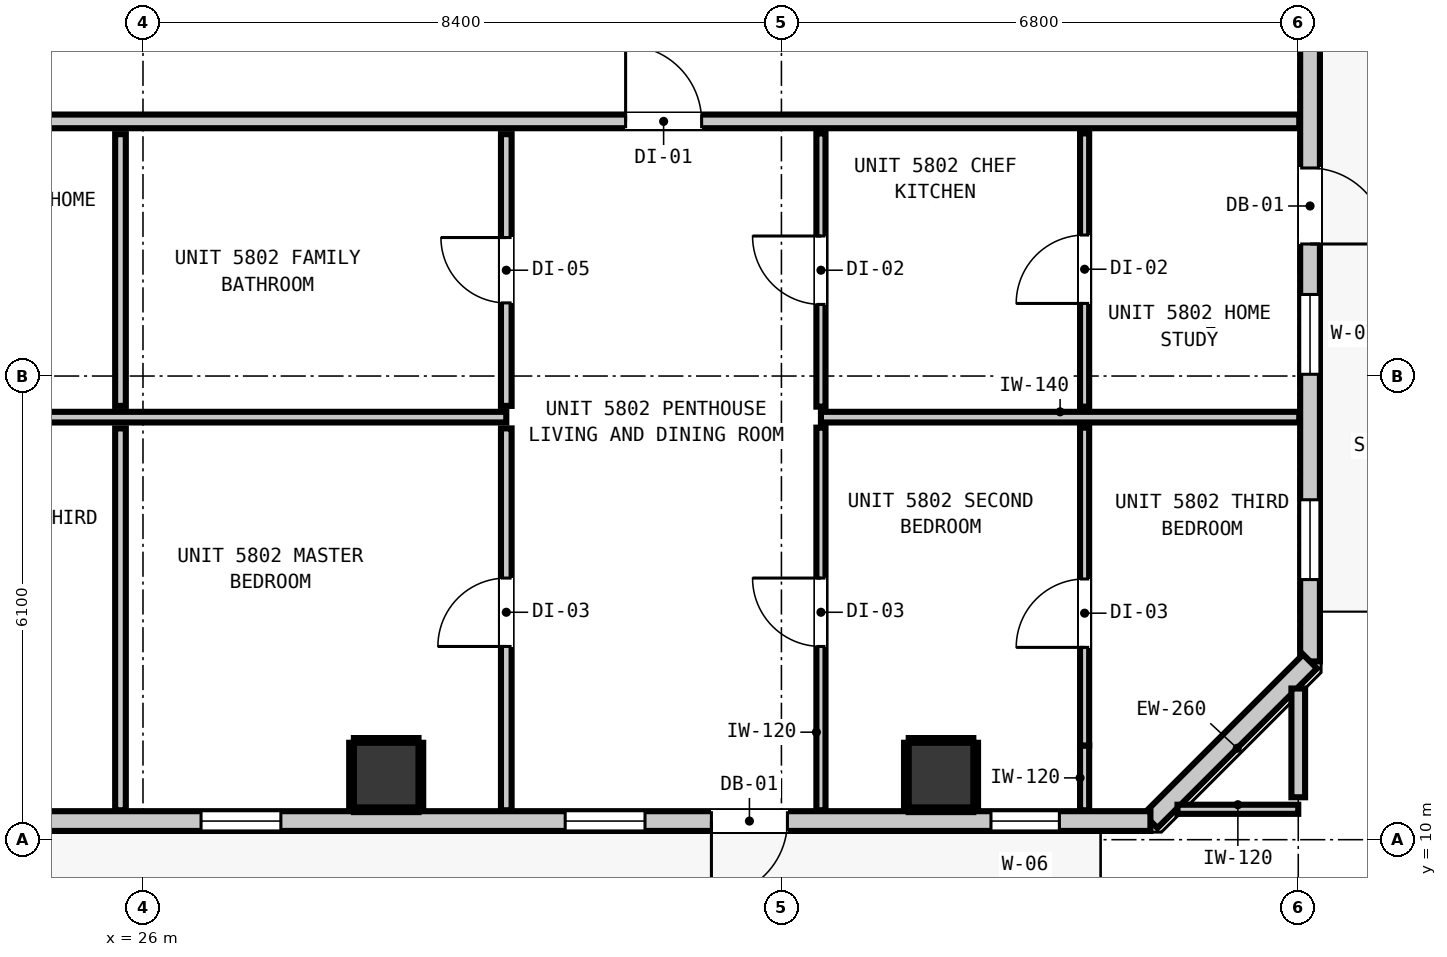
"""IFC4 building model, lengths in metres.
Left out: names, types, materials, properties, quantities, classifications, styles, units other than length and angle.
Written with IfcOpenShell. Run it as: python <this file> out.ifc"""

import sys

from ifc_helpers import new_model, si_unit, direction, frame, frame_2d, origin, origin_2d, place, context, subcontext, project, spatial, rectangle, extrude, element, fill, save


model = new_model("IFC4")
c1 = context("Model", 3, precision=1e-05, world=origin(), true_north=direction((0.0, 1.0)))
c2 = subcontext(c1, "Body", "Model", "MODEL_VIEW")
j1 = project(units=[si_unit("LENGTHUNIT", "METRE"), si_unit("PLANEANGLEUNIT", "RADIAN")], contexts=[c1])
p1 = place(None, origin())
s1 = spatial("IfcSite", under=j1, at=p1, CompositionType="ELEMENT")
p2 = place(p1, origin())
s2 = spatial("IfcBuilding", under=s1, at=p2, CompositionType="ELEMENT")
p3 = place(p2, frame((0.0, 0.0, 200.12)))
s3 = spatial("IfcBuildingStorey", under=s2, at=p3, CompositionType="ELEMENT", Elevation=200.12)
for number, where, z_axis, x_axis in (
    (1, (29.2, 10.85, 0.0), (0.0, 0.0, 1.0), (1.0, 0.0, 0.0)),
    (2, (36.5, 10.85, 0.0), (0.0, 0.0, 1.0), (1.0, 0.0, 0.0)),
):
    element("IfcColumn", number, at=place(p3, frame(where, z_axis=z_axis, x_axis=x_axis)), inside=s3, PredefinedType="COLUMN", context=c2, shape_type="SweptSolid", body=[
        extrude(rectangle(XDim=0.85, YDim=0.85, at=origin_2d()), origin(), (0.0, 0.0, 1.0), 3.32),
    ])
p4 = place(p3, frame((41.355, 42.655, 0.0), z_axis=(0.0, 0.0, 1.0), x_axis=(0.0, -1.0, 0.0)))
e3 = element("IfcWall", 3, at=p4, inside=s3, PredefinedType="STANDARD", context=c2, shape_type="SweptSolid", body=[
    extrude(rectangle(XDim=30.31, YDim=0.26, at=frame_2d((15.155, 0.0))), origin(), (0.0, 0.0, 1.0), 3.1),
])
p5 = place(p4, frame((23.818, 0.0, 0.0)))
e4 = element("IfcOpeningElement", 4, at=p5, cuts=e3, PredefinedType="OPENING", context=c2, shape_type="SweptSolid", body=[
    extrude(rectangle(XDim=1.0, YDim=2.15, at=frame_2d((0.5, 1.075))), frame((0.0, 0.14, 0.0), z_axis=(0.0, -1.0, 0.0), x_axis=(1.0, 0.0, 0.0)), (0.0, 0.0, 1.0), 0.28),
])
p6 = place(p4, frame((25.482, 0.0, 0.85)))
e5 = element("IfcOpeningElement", 5, at=p6, cuts=e3, PredefinedType="OPENING", context=c2, shape_type="SweptSolid", body=[
    extrude(rectangle(XDim=1.05, YDim=1.65, at=frame_2d((0.525, 0.825))), frame((0.0, 0.14, 0.0), z_axis=(0.0, -1.0, 0.0), x_axis=(1.0, 0.0, 0.0)), (0.0, 0.0, 1.0), 0.28),
])
p7 = place(p4, frame((28.183, 0.0, 0.85)))
e6 = element("IfcOpeningElement", 6, at=p7, cuts=e3, PredefinedType="OPENING", context=c2, shape_type="SweptSolid", body=[
    extrude(rectangle(XDim=1.05, YDim=1.65, at=frame_2d((0.525, 0.825))), frame((0.0, 0.14, 0.0), z_axis=(0.0, -1.0, 0.0), x_axis=(1.0, 0.0, 0.0)), (0.0, 0.0, 1.0), 0.28),
])
p8 = place(p3, frame((41.355, 12.345, 0.0), z_axis=(0.0, 0.0, 1.0), x_axis=(-0.707147883682, -0.707065676302, 0.0)))
e7 = element("IfcWall", 7, at=p8, inside=s3, PredefinedType="STANDARD", context=c2, shape_type="SweptSolid", body=[
    extrude(rectangle(XDim=2.97, YDim=0.26, at=frame_2d((1.485, 0.0))), origin(), (0.0, 0.0, 1.0), 3.1),
])
p9 = place(p3, frame((39.255, 10.245, 0.0), z_axis=(0.0, 0.0, 1.0), x_axis=(-1.0, 0.0, 0.0)))
e8 = element("IfcWall", 8, at=p9, inside=s3, PredefinedType="STANDARD", context=c2, shape_type="SweptSolid", body=[
    extrude(rectangle(XDim=32.71, YDim=0.26, at=frame_2d((16.355, 0.0))), origin(), (0.0, 0.0, 1.0), 3.1),
])
p10 = place(p9, frame((4.776, 0.0, 0.0)))
e9 = element("IfcOpeningElement", 9, at=p10, cuts=e8, PredefinedType="OPENING", context=c2, shape_type="SweptSolid", body=[
    extrude(rectangle(XDim=1.0, YDim=2.15, at=frame_2d((0.5, 1.075))), frame((0.0, 0.14, 0.0), z_axis=(0.0, -1.0, 0.0), x_axis=(1.0, 0.0, 0.0)), (0.0, 0.0, 1.0), 0.28),
])
p11 = place(p9, frame((26.49, 0.0, 0.85)))
e10 = element("IfcOpeningElement", 10, at=p11, cuts=e8, PredefinedType="OPENING", context=c2, shape_type="SweptSolid", body=[
    extrude(rectangle(XDim=3.0, YDim=2.1, at=frame_2d((1.5, 1.05))), frame((0.0, 0.14, 0.0), z_axis=(0.0, -1.0, 0.0), x_axis=(1.0, 0.0, 0.0)), (0.0, 0.0, 1.0), 0.28),
])
p12 = place(p9, frame((30.736, 0.0, 0.85)))
e11 = element("IfcOpeningElement", 11, at=p12, cuts=e8, PredefinedType="OPENING", context=c2, shape_type="SweptSolid", body=[
    extrude(rectangle(XDim=1.05, YDim=1.65, at=frame_2d((0.525, 0.825))), frame((0.0, 0.14, 0.0), z_axis=(0.0, -1.0, 0.0), x_axis=(1.0, 0.0, 0.0)), (0.0, 0.0, 1.0), 0.28),
])
p13 = place(p9, frame((19.625, 0.0, 0.85)))
e12 = element("IfcOpeningElement", 12, at=p13, cuts=e8, PredefinedType="OPENING", context=c2, shape_type="SweptSolid", body=[
    extrude(rectangle(XDim=3.0, YDim=2.1, at=frame_2d((1.5, 1.05))), frame((0.0, 0.14, 0.0), z_axis=(0.0, -1.0, 0.0), x_axis=(1.0, 0.0, 0.0)), (0.0, 0.0, 1.0), 0.28),
])
p14 = place(p9, frame((14.688, 0.0, 0.85)))
e13 = element("IfcOpeningElement", 13, at=p14, cuts=e8, PredefinedType="OPENING", context=c2, shape_type="SweptSolid", body=[
    extrude(rectangle(XDim=1.05, YDim=1.65, at=frame_2d((0.525, 0.825))), frame((0.0, 0.14, 0.0), z_axis=(0.0, -1.0, 0.0), x_axis=(1.0, 0.0, 0.0)), (0.0, 0.0, 1.0), 0.28),
])
p15 = place(p9, frame((6.65, 0.0, 0.85)))
e14 = element("IfcOpeningElement", 14, at=p15, cuts=e8, PredefinedType="OPENING", context=c2, shape_type="SweptSolid", body=[
    extrude(rectangle(XDim=1.05, YDim=1.65, at=frame_2d((0.525, 0.825))), frame((0.0, 0.14, 0.0), z_axis=(0.0, -1.0, 0.0), x_axis=(1.0, 0.0, 0.0)), (0.0, 0.0, 1.0), 0.28),
])
p16 = place(p9, frame((11.441, 0.0, 0.85)))
e15 = element("IfcOpeningElement", 15, at=p16, cuts=e8, PredefinedType="OPENING", context=c2, shape_type="SweptSolid", body=[
    extrude(rectangle(XDim=1.05, YDim=1.65, at=frame_2d((0.525, 0.825))), frame((0.0, 0.14, 0.0), z_axis=(0.0, -1.0, 0.0), x_axis=(1.0, 0.0, 0.0)), (0.0, 0.0, 1.0), 0.28),
])
p17 = place(p9, frame((1.198, 0.0, 0.85)))
e16 = element("IfcOpeningElement", 16, at=p17, cuts=e8, PredefinedType="OPENING", context=c2, shape_type="SweptSolid", body=[
    extrude(rectangle(XDim=0.9, YDim=1.5, at=frame_2d((0.45, 0.75))), frame((0.0, 0.14, 0.0), z_axis=(0.0, -1.0, 0.0), x_axis=(1.0, 0.0, 0.0)), (0.0, 0.0, 1.0), 0.28),
])
p18 = place(p3, frame((4.587, 19.45, 0.0), z_axis=(0.0, 0.0, 1.0), x_axis=(1.0, 0.0, 0.0)))
e17 = element("IfcWall", 17, at=p18, inside=s3, PredefinedType="PARTITIONING", context=c2, shape_type="SweptSolid", body=[
    extrude(rectangle(XDim=36.626, YDim=0.18, at=frame_2d((18.313, 0.0))), origin(), (0.0, 0.0, 1.0), 3.1),
])
p19 = place(p18, frame((7.533, 0.0, 0.0)))
e18 = element("IfcOpeningElement", 18, at=p19, cuts=e17, PredefinedType="OPENING", context=c2, shape_type="SweptSolid", body=[
    extrude(rectangle(XDim=1.0, YDim=2.15, at=frame_2d((0.5, 1.075))), frame((0.0, 0.1, 0.0), z_axis=(0.0, -1.0, 0.0), x_axis=(1.0, 0.0, 0.0)), (0.0, 0.0, 1.0), 0.2),
])
p20 = place(p18, frame((27.763, 0.0, 0.0)))
e19 = element("IfcOpeningElement", 19, at=p20, cuts=e17, PredefinedType="OPENING", context=c2, shape_type="SweptSolid", body=[
    extrude(rectangle(XDim=1.0, YDim=2.15, at=frame_2d((0.5, 1.075))), frame((0.0, 0.1, 0.0), z_axis=(0.0, -1.0, 0.0), x_axis=(1.0, 0.0, 0.0)), (0.0, 0.0, 1.0), 0.2),
])
p21 = place(p3, frame((15.785, 15.559, 0.0), z_axis=(0.0, 0.0, 1.0), x_axis=(1.0, 0.0, 0.0)))
e20 = element("IfcWall", 20, at=p21, inside=s3, PredefinedType="PARTITIONING", context=c2, shape_type="SweptSolid", body=[
    extrude(rectangle(XDim=14.995, YDim=0.14, at=frame_2d((7.498, 0.0))), origin(), (0.0, 0.0, 1.0), 3.1),
])
p22 = place(p3, frame((34.92, 15.559, 0.0), z_axis=(0.0, 0.0, 1.0), x_axis=(1.0, 0.0, 0.0)))
e21 = element("IfcWall", 21, at=p22, inside=s3, PredefinedType="PARTITIONING", context=c2, shape_type="SweptSolid", body=[
    extrude(rectangle(XDim=6.293, YDim=0.14, at=frame_2d((3.146, 0.0))), origin(), (0.0, 0.0, 1.0), 3.1),
])
p23 = place(p3, frame((39.611, 10.4, 0.0), z_axis=(0.0, 0.0, 1.0), x_axis=(1.0, 0.0, 0.0)))
e22 = element("IfcWall", 22, at=p23, inside=s3, PredefinedType="PARTITIONING", context=c2, shape_type="SweptSolid", body=[
    extrude(rectangle(XDim=1.589, YDim=0.12, at=frame_2d((0.794, 0.0))), origin(), (0.0, 0.0, 1.0), 3.1),
])
p24 = place(p3, frame((41.2, 10.558, 0.0), z_axis=(0.0, 0.0, 1.0), x_axis=(0.0, 1.0, 0.0)))
e23 = element("IfcWall", 23, at=p24, inside=s3, PredefinedType="PARTITIONING", context=c2, shape_type="SweptSolid", body=[
    extrude(rectangle(XDim=1.431, YDim=0.18, at=frame_2d((0.715, 0.0))), origin(), (0.0, 0.0, 1.0), 3.1),
])
p25 = place(p3, frame((25.704, 10.387, 0.0), z_axis=(0.0, 0.0, 1.0), x_axis=(0.0, 1.0, 0.0)))
e24 = element("IfcWall", 24, at=p25, inside=s3, PredefinedType="PARTITIONING", context=c2, shape_type="SweptSolid", body=[
    extrude(rectangle(XDim=5.024, YDim=0.14, at=frame_2d((2.512, 0.0))), origin(), (0.0, 0.0, 1.0), 3.1),
])
p26 = place(p3, frame((25.704, 15.707, 0.0), z_axis=(0.0, 0.0, 1.0), x_axis=(0.0, 1.0, 0.0)))
e25 = element("IfcWall", 25, at=p26, inside=s3, PredefinedType="PARTITIONING", context=c2, shape_type="SweptSolid", body=[
    extrude(rectangle(XDim=3.575, YDim=0.14, at=frame_2d((1.788, 0.0))), origin(), (0.0, 0.0, 1.0), 3.1),
])
p27 = place(p3, frame((30.78, 10.387, 0.0), z_axis=(0.0, 0.0, 1.0), x_axis=(0.0, 1.0, 0.0)))
e26 = element("IfcWall", 26, at=p27, inside=s3, PredefinedType="PARTITIONING", context=c2, shape_type="SweptSolid", body=[
    extrude(rectangle(XDim=5.024, YDim=0.14, at=frame_2d((2.512, 0.0))), origin(), (0.0, 0.0, 1.0), 3.1),
])
p28 = place(p27, frame((2.155, 0.0, 0.0)))
e27 = element("IfcOpeningElement", 27, at=p28, cuts=e26, PredefinedType="OPENING", context=c2, shape_type="SweptSolid", body=[
    extrude(rectangle(XDim=0.9, YDim=2.1, at=frame_2d((0.45, 1.05))), frame((0.0, 0.08, 0.0), z_axis=(0.0, -1.0, 0.0), x_axis=(1.0, 0.0, 0.0)), (0.0, 0.0, 1.0), 0.16),
])
p29 = place(p3, frame((30.78, 15.707, 0.0), z_axis=(0.0, 0.0, 1.0), x_axis=(0.0, 1.0, 0.0)))
e28 = element("IfcWall", 28, at=p29, inside=s3, PredefinedType="PARTITIONING", context=c2, shape_type="SweptSolid", body=[
    extrude(rectangle(XDim=3.575, YDim=0.14, at=frame_2d((1.788, 0.0))), origin(), (0.0, 0.0, 1.0), 3.1),
])
p30 = place(p29, frame((1.355, 0.0, 0.0)))
e29 = element("IfcOpeningElement", 29, at=p30, cuts=e28, PredefinedType="OPENING", context=c2, shape_type="SweptSolid", body=[
    extrude(rectangle(XDim=0.86, YDim=2.02, at=frame_2d((0.43, 1.01))), frame((0.0, 0.08, 0.0), z_axis=(0.0, -1.0, 0.0), x_axis=(1.0, 0.0, 0.0)), (0.0, 0.0, 1.0), 0.16),
])
p31 = place(p3, frame((34.92, 10.387, 0.0), z_axis=(0.0, 0.0, 1.0), x_axis=(0.0, 1.0, 0.0)))
e30 = element("IfcWall", 30, at=p31, inside=s3, PredefinedType="PARTITIONING", context=c2, shape_type="SweptSolid", body=[
    extrude(rectangle(XDim=5.034, YDim=0.12, at=frame_2d((2.517, 0.0))), origin(), (0.0, 0.0, 1.0), 3.1),
])
p32 = place(p31, frame((2.155, 0.0, 0.0)))
e31 = element("IfcOpeningElement", 31, at=p32, cuts=e30, PredefinedType="OPENING", context=c2, shape_type="SweptSolid", body=[
    extrude(rectangle(XDim=0.9, YDim=2.1, at=frame_2d((0.45, 1.05))), frame((0.0, 0.07, 0.0), z_axis=(0.0, -1.0, 0.0), x_axis=(1.0, 0.0, 0.0)), (0.0, 0.0, 1.0), 0.14),
])
p33 = place(p3, frame((34.92, 15.697, 0.0), z_axis=(0.0, 0.0, 1.0), x_axis=(0.0, 1.0, 0.0)))
e32 = element("IfcWall", 32, at=p33, inside=s3, PredefinedType="PARTITIONING", context=c2, shape_type="SweptSolid", body=[
    extrude(rectangle(XDim=3.595, YDim=0.12, at=frame_2d((1.797, 0.0))), origin(), (0.0, 0.0, 1.0), 3.1),
])
p34 = place(p33, frame((1.345, 0.0, 0.0)))
e33 = element("IfcOpeningElement", 33, at=p34, cuts=e32, PredefinedType="OPENING", context=c2, shape_type="SweptSolid", body=[
    extrude(rectangle(XDim=0.9, YDim=2.1, at=frame_2d((0.45, 1.05))), frame((0.0, 0.07, 0.0), z_axis=(0.0, -1.0, 0.0), x_axis=(1.0, 0.0, 0.0)), (0.0, 0.0, 1.0), 0.14),
])
p35 = place(p3, frame((38.389, 10.387, 0.0), z_axis=(0.0, 0.0, 1.0), x_axis=(0.0, 1.0, 0.0)))
e34 = element("IfcWall", 34, at=p35, inside=s3, PredefinedType="PARTITIONING", context=c2, shape_type="SweptSolid", body=[
    extrude(rectangle(XDim=0.852, YDim=0.12, at=frame_2d((0.426, 0.0))), origin(), (0.0, 0.0, 1.0), 3.1),
])
p36 = place(p3, frame((38.389, 11.239, 0.0), z_axis=(0.0, 0.0, 1.0), x_axis=(0.0, 1.0, 0.0)))
e35 = element("IfcWall", 35, at=p36, inside=s3, PredefinedType="PARTITIONING", context=c2, shape_type="SweptSolid", body=[
    extrude(rectangle(XDim=4.182, YDim=0.12, at=frame_2d((2.091, 0.0))), origin(), (0.0, 0.0, 1.0), 2.477),
])
p37 = place(p36, frame((1.291, 0.0, 0.0)))
e36 = element("IfcOpeningElement", 36, at=p37, cuts=e35, PredefinedType="OPENING", context=c2, shape_type="SweptSolid", body=[
    extrude(rectangle(XDim=0.9, YDim=2.1, at=frame_2d((0.45, 1.05))), frame((0.0, 0.07, 0.0), z_axis=(0.0, -1.0, 0.0), x_axis=(1.0, 0.0, 0.0)), (0.0, 0.0, 1.0), 0.14),
])
p38 = place(p3, frame((38.389, 15.697, 0.0), z_axis=(0.0, 0.0, 1.0), x_axis=(0.0, 1.0, 0.0)))
e37 = element("IfcWall", 37, at=p38, inside=s3, PredefinedType="PARTITIONING", context=c2, shape_type="SweptSolid", body=[
    extrude(rectangle(XDim=3.595, YDim=0.12, at=frame_2d((1.797, 0.0))), origin(), (0.0, 0.0, 1.0), 2.477),
])
p39 = place(p38, frame((1.358, 0.0, 0.0)))
e38 = element("IfcOpeningElement", 38, at=p39, cuts=e37, PredefinedType="OPENING", context=c2, shape_type="SweptSolid", body=[
    extrude(rectangle(XDim=0.9, YDim=2.1, at=frame_2d((0.45, 1.05))), frame((0.0, 0.07, 0.0), z_axis=(0.0, -1.0, 0.0), x_axis=(1.0, 0.0, 0.0)), (0.0, 0.0, 1.0), 0.14),
])
for number, where, z_axis, x_axis in (
    (39, (28.775, 10.393, 0.0), (0.0, 0.0, 1.0), (1.0, 0.0, 0.0)),
    (40, (28.775, 11.307, 0.0), (0.0, 0.0, 1.0), (1.0, 0.0, 0.0)),
):
    element("IfcWall", number, at=place(p3, frame(where, z_axis=z_axis, x_axis=x_axis)), inside=s3, PredefinedType="PARTITIONING", context=c2, shape_type="SweptSolid", body=[
        extrude(rectangle(XDim=0.85, YDim=0.06, at=frame_2d((0.425, 0.0))), origin(), (0.0, 0.0, 1.0), 1.45),
    ])
for number, where, z_axis, x_axis in (
    (41, (28.743, 10.425, 0.0), (0.0, 0.0, 1.0), (0.0, 1.0, 0.0)),
    (42, (29.657, 10.425, 0.0), (0.0, 0.0, 1.0), (0.0, 1.0, 0.0)),
):
    element("IfcWall", number, at=place(p3, frame(where, z_axis=z_axis, x_axis=x_axis)), inside=s3, PredefinedType="PARTITIONING", context=c2, shape_type="SweptSolid", body=[
        extrude(rectangle(XDim=0.85, YDim=0.06, at=frame_2d((0.425, 0.0))), origin(), (0.0, 0.0, 1.0), 1.45),
    ])
for number, where, z_axis, x_axis in (
    (43, (36.075, 10.393, 0.0), (0.0, 0.0, 1.0), (1.0, 0.0, 0.0)),
    (44, (36.075, 11.307, 0.0), (0.0, 0.0, 1.0), (1.0, 0.0, 0.0)),
):
    element("IfcWall", number, at=place(p3, frame(where, z_axis=z_axis, x_axis=x_axis)), inside=s3, PredefinedType="PARTITIONING", context=c2, shape_type="SweptSolid", body=[
        extrude(rectangle(XDim=0.85, YDim=0.06, at=frame_2d((0.425, 0.0))), origin(), (0.0, 0.0, 1.0), 1.45),
    ])
for number, where, z_axis, x_axis in (
    (45, (36.043, 10.425, 0.0), (0.0, 0.0, 1.0), (0.0, 1.0, 0.0)),
    (46, (36.957, 10.425, 0.0), (0.0, 0.0, 1.0), (0.0, 1.0, 0.0)),
):
    element("IfcWall", number, at=place(p3, frame(where, z_axis=z_axis, x_axis=x_axis)), inside=s3, PredefinedType="PARTITIONING", context=c2, shape_type="SweptSolid", body=[
        extrude(rectangle(XDim=0.85, YDim=0.06, at=frame_2d((0.425, 0.0))), origin(), (0.0, 0.0, 1.0), 1.45),
    ])
p40 = place(p10, origin())
e47 = element("IfcDoor", 47, at=p40, inside=s3, OperationType="SINGLE_SWING_RIGHT", PredefinedType="DOOR", context=c2, shape_type="SweptSolid", body=[
    extrude(rectangle(XDim=1.0, YDim=2.15, at=frame_2d((0.5, 1.075))), frame((0.0, 0.025, 0.0), z_axis=(0.0, -1.0, 0.0), x_axis=(1.0, 0.0, 0.0)), (0.0, 0.0, 1.0), 0.05),
])
fill(e9, e47)
p41 = place(p5, origin())
e48 = element("IfcDoor", 48, at=p41, inside=s3, OperationType="SINGLE_SWING_RIGHT", PredefinedType="DOOR", context=c2, shape_type="SweptSolid", body=[
    extrude(rectangle(XDim=1.0, YDim=2.15, at=frame_2d((0.5, 1.075))), frame((0.0, 0.025, 0.0), z_axis=(0.0, -1.0, 0.0), x_axis=(1.0, 0.0, 0.0)), (0.0, 0.0, 1.0), 0.05),
])
fill(e4, e48)
p42 = place(p6, origin())
e49 = element("IfcWindow", 49, at=p42, inside=s3, PartitioningType="SINGLE_PANEL", PredefinedType="WINDOW", context=c2, shape_type="SweptSolid", body=[
    extrude(rectangle(XDim=1.05, YDim=1.65, at=frame_2d((0.525, 0.825))), frame((0.0, 0.03, 0.0), z_axis=(0.0, -1.0, 0.0), x_axis=(1.0, 0.0, 0.0)), (0.0, 0.0, 1.0), 0.06),
])
fill(e5, e49)
p43 = place(p7, origin())
e50 = element("IfcWindow", 50, at=p43, inside=s3, PartitioningType="SINGLE_PANEL", PredefinedType="WINDOW", context=c2, shape_type="SweptSolid", body=[
    extrude(rectangle(XDim=1.05, YDim=1.65, at=frame_2d((0.525, 0.825))), frame((0.0, 0.03, 0.0), z_axis=(0.0, -1.0, 0.0), x_axis=(1.0, 0.0, 0.0)), (0.0, 0.0, 1.0), 0.06),
])
fill(e6, e50)
p44 = place(p15, origin())
e51 = element("IfcWindow", 51, at=p44, inside=s3, PartitioningType="SINGLE_PANEL", PredefinedType="WINDOW", context=c2, shape_type="SweptSolid", body=[
    extrude(rectangle(XDim=1.05, YDim=1.65, at=frame_2d((0.525, 0.825))), frame((0.0, 0.03, 0.0), z_axis=(0.0, -1.0, 0.0), x_axis=(1.0, 0.0, 0.0)), (0.0, 0.0, 1.0), 0.06),
])
fill(e14, e51)
p45 = place(p16, origin())
e52 = element("IfcWindow", 52, at=p45, inside=s3, PartitioningType="SINGLE_PANEL", PredefinedType="WINDOW", context=c2, shape_type="SweptSolid", body=[
    extrude(rectangle(XDim=1.05, YDim=1.65, at=frame_2d((0.525, 0.825))), frame((0.0, 0.03, 0.0), z_axis=(0.0, -1.0, 0.0), x_axis=(1.0, 0.0, 0.0)), (0.0, 0.0, 1.0), 0.06),
])
fill(e15, e52)
p46 = place(p17, origin())
e53 = element("IfcWindow", 53, at=p46, inside=s3, PartitioningType="SINGLE_PANEL", PredefinedType="WINDOW", context=c2, shape_type="SweptSolid", body=[
    extrude(rectangle(XDim=0.9, YDim=1.5, at=frame_2d((0.45, 0.75))), frame((0.0, 0.03, 0.0), z_axis=(0.0, -1.0, 0.0), x_axis=(1.0, 0.0, 0.0)), (0.0, 0.0, 1.0), 0.06),
])
fill(e16, e53)
p47 = place(p20, origin())
e54 = element("IfcDoor", 54, at=p47, inside=s3, OperationType="SINGLE_SWING_LEFT", PredefinedType="DOOR", context=c2, shape_type="SweptSolid", body=[
    extrude(rectangle(XDim=1.0, YDim=2.15, at=frame_2d((0.5, 1.075))), frame((0.0, 0.025, 0.0), z_axis=(0.0, -1.0, 0.0), x_axis=(1.0, 0.0, 0.0)), (0.0, 0.0, 1.0), 0.05),
])
fill(e19, e54)
p48 = place(p30, origin())
e55 = element("IfcDoor", 55, at=p48, inside=s3, OperationType="SINGLE_SWING_RIGHT", PredefinedType="DOOR", context=c2, shape_type="SweptSolid", body=[
    extrude(rectangle(XDim=0.86, YDim=2.02, at=frame_2d((0.43, 1.01))), frame((0.0, 0.025, 0.0), z_axis=(0.0, -1.0, 0.0), x_axis=(1.0, 0.0, 0.0)), (0.0, 0.0, 1.0), 0.05),
])
fill(e29, e55)
p49 = place(p28, origin())
e56 = element("IfcDoor", 56, at=p49, inside=s3, OperationType="SINGLE_SWING_LEFT", PredefinedType="DOOR", context=c2, shape_type="SweptSolid", body=[
    extrude(rectangle(XDim=0.9, YDim=2.1, at=frame_2d((0.45, 1.05))), frame((0.0, 0.025, 0.0), z_axis=(0.0, -1.0, 0.0), x_axis=(1.0, 0.0, 0.0)), (0.0, 0.0, 1.0), 0.05),
])
fill(e27, e56)
p50 = place(p34, origin())
e57 = element("IfcDoor", 57, at=p50, inside=s3, OperationType="SINGLE_SWING_RIGHT", PredefinedType="DOOR", context=c2, shape_type="SweptSolid", body=[
    extrude(rectangle(XDim=0.9, YDim=2.1, at=frame_2d((0.45, 1.05))), frame((0.0, 0.025, 0.0), z_axis=(0.0, -1.0, 0.0), x_axis=(1.0, 0.0, 0.0)), (0.0, 0.0, 1.0), 0.05),
])
fill(e33, e57)
p51 = place(p39, origin())
e58 = element("IfcDoor", 58, at=p51, inside=s3, OperationType="SINGLE_SWING_LEFT", PredefinedType="DOOR", context=c2, shape_type="SweptSolid", body=[
    extrude(rectangle(XDim=0.9, YDim=2.1, at=frame_2d((0.45, 1.05))), frame((0.0, 0.025, 0.0), z_axis=(0.0, -1.0, 0.0), x_axis=(1.0, 0.0, 0.0)), (0.0, 0.0, 1.0), 0.05),
])
fill(e38, e58)
p52 = place(p32, origin())
e59 = element("IfcDoor", 59, at=p52, inside=s3, OperationType="SINGLE_SWING_RIGHT", PredefinedType="DOOR", context=c2, shape_type="SweptSolid", body=[
    extrude(rectangle(XDim=0.9, YDim=2.1, at=frame_2d((0.45, 1.05))), frame((0.0, 0.025, 0.0), z_axis=(0.0, -1.0, 0.0), x_axis=(1.0, 0.0, 0.0)), (0.0, 0.0, 1.0), 0.05),
])
fill(e31, e59)
p53 = place(p37, origin())
e60 = element("IfcDoor", 60, at=p53, inside=s3, OperationType="SINGLE_SWING_LEFT", PredefinedType="DOOR", context=c2, shape_type="SweptSolid", body=[
    extrude(rectangle(XDim=0.9, YDim=2.1, at=frame_2d((0.45, 1.05))), frame((0.0, 0.025, 0.0), z_axis=(0.0, -1.0, 0.0), x_axis=(1.0, 0.0, 0.0)), (0.0, 0.0, 1.0), 0.05),
])
fill(e36, e60)
save(model, sys.argv[1])
